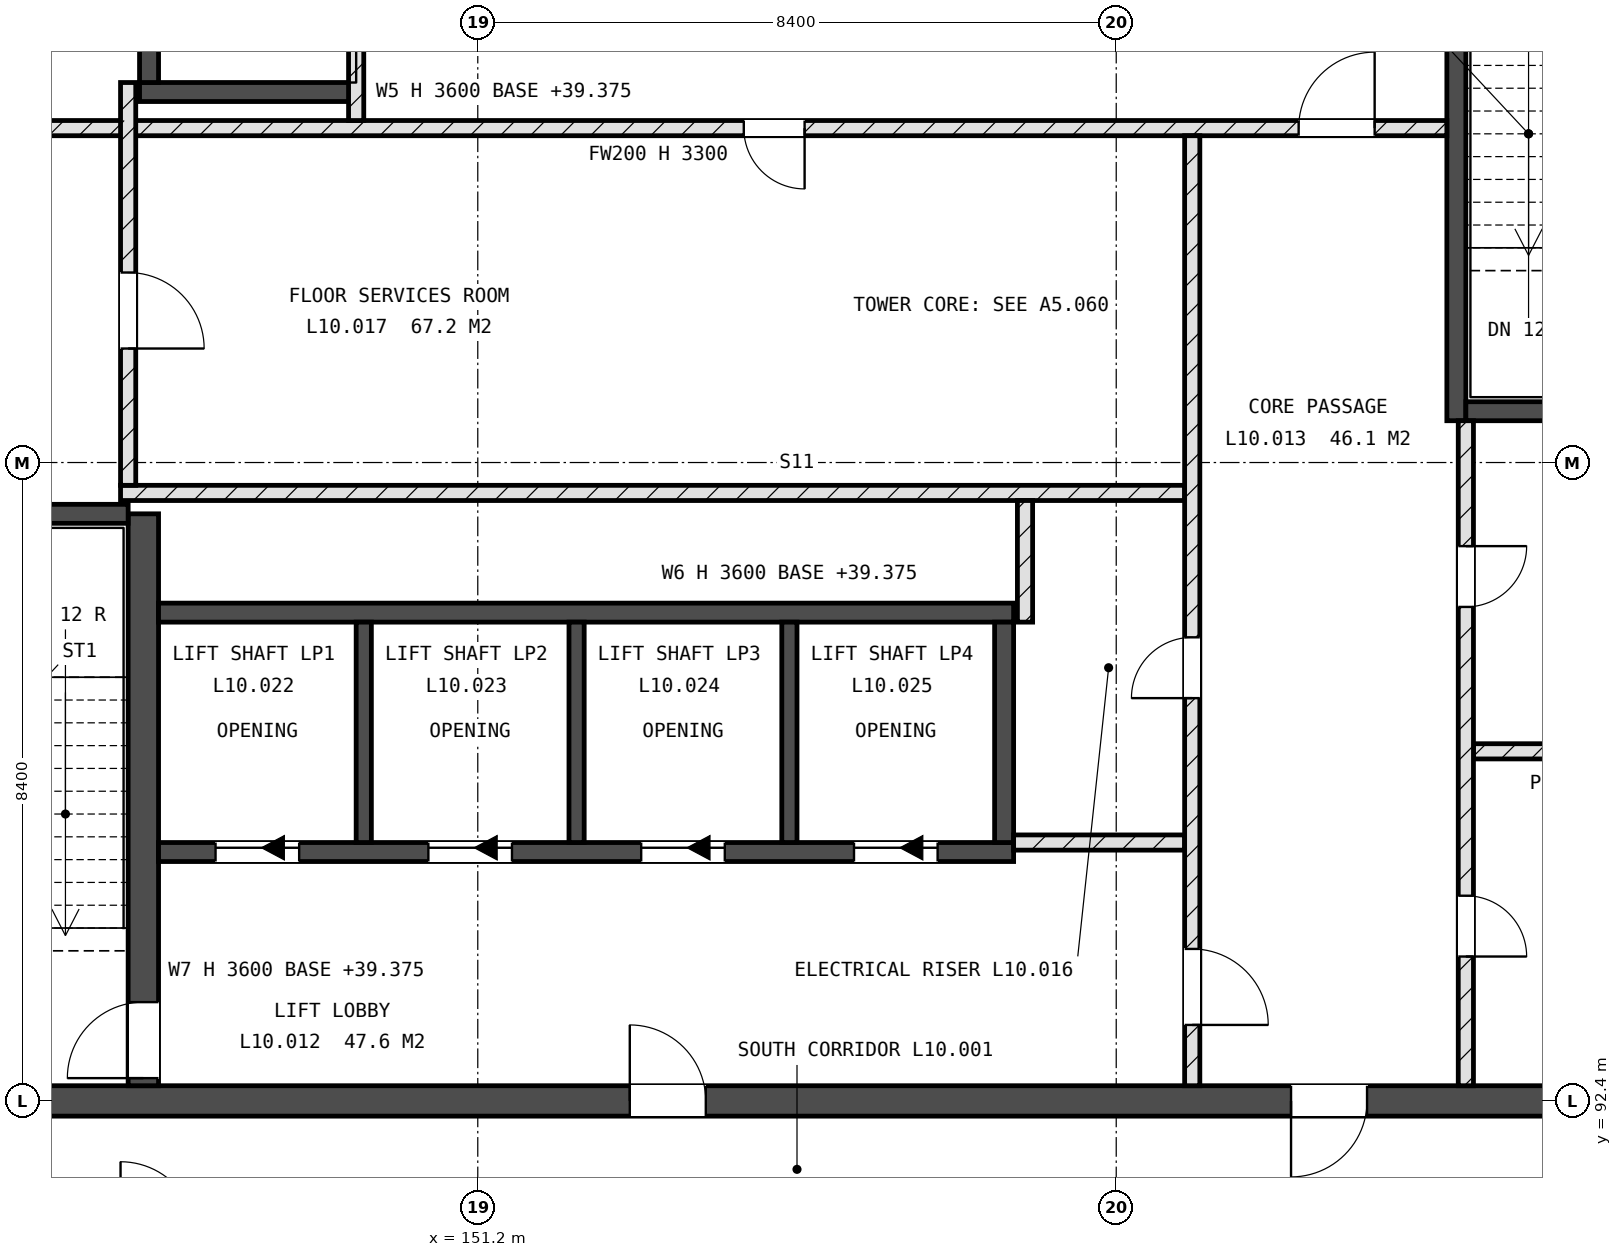
"""IFC4 building model, lengths in metres.
Left out: names, types, materials, properties, quantities, classifications, styles, units other than length and angle.
Written with IfcOpenShell. Run it as: python <this file> out.ifc"""

import sys

from ifc_helpers import new_model, si_unit, direction, frame, frame_2d, origin, place, context, subcontext, project, spatial, rectangle, extrude, element, fill, save


model = new_model("IFC4")
c1 = context("Model", 3, precision=1e-05, world=origin(), true_north=direction((0.0, 1.0)))
c2 = subcontext(c1, "Body", "Model", "MODEL_VIEW")
j1 = project(units=[si_unit("LENGTHUNIT", "METRE"), si_unit("PLANEANGLEUNIT", "RADIAN")], contexts=[c1])
p1 = place(None, origin())
s1 = spatial("IfcSite", under=j1, at=p1, CompositionType="ELEMENT")
p2 = place(p1, origin())
s2 = spatial("IfcBuilding", under=s1, at=p2, CompositionType="ELEMENT")
p3 = place(p2, frame((0.0, 0.0, 39.6)))
s3 = spatial("IfcBuildingStorey", under=s2, at=p3, CompositionType="ELEMENT", Elevation=39.6)
p4 = place(p3, frame((142.8, 92.4, -0.225), z_axis=(0.0, 0.0, 1.0), x_axis=(1.0, 0.0, 0.0)))
e1 = element("IfcWall", 1, at=p4, inside=s3, PredefinedType="SHEAR", context=c2, shape_type="SweptSolid", body=[
    extrude(rectangle(XDim=25.2, YDim=0.4, at=frame_2d((12.6, 0.0))), origin(), (0.0, 0.0, 1.0), 3.6),
])
p5 = place(p4, frame((1.4, 0.0, 0.225)))
e2 = element("IfcOpeningElement", 2, at=p5, cuts=e1, PredefinedType="OPENING", context=c2, shape_type="SweptSolid", body=[
    extrude(rectangle(XDim=1.0, YDim=2.1, at=frame_2d((0.5, 1.05))), frame((0.0, 0.21, 0.0), z_axis=(0.0, -1.0, 0.0), x_axis=(1.0, 0.0, 0.0)), (0.0, 0.0, 1.0), 0.42),
])
p6 = place(p4, frame((19.1, 0.0, 0.225)))
e3 = element("IfcOpeningElement", 3, at=p6, cuts=e1, PredefinedType="OPENING", context=c2, shape_type="SweptSolid", body=[
    extrude(rectangle(XDim=1.0, YDim=2.1, at=frame_2d((0.5, 1.05))), frame((0.0, 0.21, 0.0), z_axis=(0.0, -1.0, 0.0), x_axis=(1.0, 0.0, 0.0)), (0.0, 0.0, 1.0), 0.42),
])
p7 = place(p4, frame((10.4, 0.0, 0.225)))
e4 = element("IfcOpeningElement", 4, at=p7, cuts=e1, PredefinedType="OPENING", context=c2, shape_type="SweptSolid", body=[
    extrude(rectangle(XDim=1.0, YDim=2.1, at=frame_2d((0.5, 1.05))), frame((0.0, 0.21, 0.0), z_axis=(0.0, -1.0, 0.0), x_axis=(1.0, 0.0, 0.0)), (0.0, 0.0, 1.0), 0.42),
])
p8 = place(p3, frame((146.8, 92.6, -0.225), z_axis=(0.0, 0.0, 1.0), x_axis=(0.0, 1.0, 0.0)))
e5 = element("IfcWall", 5, at=p8, inside=s3, PredefinedType="SHEAR", context=c2, shape_type="SweptSolid", body=[
    extrude(rectangle(XDim=7.525, YDim=0.4, at=frame_2d((3.762, 0.0))), origin(), (0.0, 0.0, 1.0), 3.6),
])
p9 = place(p8, frame((0.1, 0.0, 0.225)))
e6 = element("IfcOpeningElement", 6, at=p9, cuts=e5, PredefinedType="OPENING", context=c2, shape_type="SweptSolid", body=[
    extrude(rectangle(XDim=1.0, YDim=2.1, at=frame_2d((0.5, 1.05))), frame((0.0, 0.21, 0.0), z_axis=(0.0, -1.0, 0.0), x_axis=(1.0, 0.0, 0.0)), (0.0, 0.0, 1.0), 0.42),
])
p10 = place(p3, frame((143.2, 100.125, -0.225), z_axis=(0.0, 0.0, 1.0), x_axis=(1.0, 0.0, 0.0)))
e7 = element("IfcWall", 7, at=p10, inside=s3, PredefinedType="SHEAR", context=c2, shape_type="SweptSolid", body=[
    extrude(rectangle(XDim=3.4, YDim=0.25, at=frame_2d((1.7, 0.0))), origin(), (0.0, 0.0, 1.0), 3.6),
])
p11 = place(p3, frame((164.075, 101.35, -0.225), z_axis=(0.0, 0.0, 1.0), x_axis=(0.0, 1.0, 0.0)))
e8 = element("IfcWall", 8, at=p11, inside=s3, PredefinedType="SHEAR", context=c2, shape_type="SweptSolid", body=[
    extrude(rectangle(XDim=7.65, YDim=0.25, at=frame_2d((3.825, 0.0))), origin(), (0.0, 0.0, 1.0), 3.6),
])
p12 = place(p11, frame((6.55, 0.0, 0.225)))
e9 = element("IfcOpeningElement", 9, at=p12, cuts=e8, PredefinedType="OPENING", context=c2, shape_type="SweptSolid", body=[
    extrude(rectangle(XDim=1.0, YDim=2.1, at=frame_2d((0.5, 1.05))), frame((0.0, 0.135, 0.0), z_axis=(0.0, -1.0, 0.0), x_axis=(1.0, 0.0, 0.0)), (0.0, 0.0, 1.0), 0.27),
])
p13 = place(p3, frame((164.2, 101.475, -0.225), z_axis=(0.0, 0.0, 1.0), x_axis=(1.0, 0.0, 0.0)))
e10 = element("IfcWall", 10, at=p13, inside=s3, PredefinedType="SHEAR", context=c2, shape_type="SweptSolid", body=[
    extrude(rectangle(XDim=3.6, YDim=0.25, at=frame_2d((1.8, 0.0))), origin(), (0.0, 0.0, 1.0), 3.6),
])
p14 = place(p3, frame((147.0, 95.675, -0.225), z_axis=(0.0, 0.0, 1.0), x_axis=(1.0, 0.0, 0.0)))
e11 = element("IfcWall", 11, at=p14, inside=s3, PredefinedType="SHEAR", context=c2, shape_type="SweptSolid", body=[
    extrude(rectangle(XDim=11.25, YDim=0.25, at=frame_2d((5.625, 0.0))), origin(), (0.0, 0.0, 1.0), 3.6),
])
p15 = place(p14, frame((0.75, 0.0, 0.225)))
e12 = element("IfcOpeningElement", 12, at=p15, cuts=e11, PredefinedType="OPENING", context=c2, shape_type="SweptSolid", body=[
    extrude(rectangle(XDim=1.1, YDim=2.1, at=frame_2d((0.55, 1.05))), frame((0.0, 0.135, 0.0), z_axis=(0.0, -1.0, 0.0), x_axis=(1.0, 0.0, 0.0)), (0.0, 0.0, 1.0), 0.27),
])
p16 = place(p14, frame((3.55, 0.0, 0.225)))
e13 = element("IfcOpeningElement", 13, at=p16, cuts=e11, PredefinedType="OPENING", context=c2, shape_type="SweptSolid", body=[
    extrude(rectangle(XDim=1.1, YDim=2.1, at=frame_2d((0.55, 1.05))), frame((0.0, 0.135, 0.0), z_axis=(0.0, -1.0, 0.0), x_axis=(1.0, 0.0, 0.0)), (0.0, 0.0, 1.0), 0.27),
])
p17 = place(p14, frame((6.35, 0.0, 0.225)))
e14 = element("IfcOpeningElement", 14, at=p17, cuts=e11, PredefinedType="OPENING", context=c2, shape_type="SweptSolid", body=[
    extrude(rectangle(XDim=1.1, YDim=2.1, at=frame_2d((0.55, 1.05))), frame((0.0, 0.135, 0.0), z_axis=(0.0, -1.0, 0.0), x_axis=(1.0, 0.0, 0.0)), (0.0, 0.0, 1.0), 0.27),
])
p18 = place(p14, frame((9.15, 0.0, 0.225)))
e15 = element("IfcOpeningElement", 15, at=p18, cuts=e11, PredefinedType="OPENING", context=c2, shape_type="SweptSolid", body=[
    extrude(rectangle(XDim=1.1, YDim=2.1, at=frame_2d((0.55, 1.05))), frame((0.0, 0.135, 0.0), z_axis=(0.0, -1.0, 0.0), x_axis=(1.0, 0.0, 0.0)), (0.0, 0.0, 1.0), 0.27),
])
p19 = place(p3, frame((147.0, 98.825, -0.225), z_axis=(0.0, 0.0, 1.0), x_axis=(1.0, 0.0, 0.0)))
e16 = element("IfcWall", 16, at=p19, inside=s3, PredefinedType="SHEAR", context=c2, shape_type="SweptSolid", body=[
    extrude(rectangle(XDim=11.25, YDim=0.25, at=frame_2d((5.625, 0.0))), origin(), (0.0, 0.0, 1.0), 3.6),
])
p20 = place(p3, frame((158.125, 95.8, -0.225), z_axis=(0.0, 0.0, 1.0), x_axis=(0.0, 1.0, 0.0)))
e17 = element("IfcWall", 17, at=p20, inside=s3, PredefinedType="SHEAR", context=c2, shape_type="SweptSolid", body=[
    extrude(rectangle(XDim=2.9, YDim=0.25, at=frame_2d((1.45, 0.0))), origin(), (0.0, 0.0, 1.0), 3.6),
])
for number, where, z_axis, x_axis in (
    (18, (149.7, 95.8, -0.225), (0.0, 0.0, 1.0), (0.0, 1.0, 0.0)),
    (19, (152.5, 95.8, -0.225), (0.0, 0.0, 1.0), (0.0, 1.0, 0.0)),
    (20, (155.3, 95.8, -0.225), (0.0, 0.0, 1.0), (0.0, 1.0, 0.0)),
):
    element("IfcWall", number, at=place(p3, frame(where, z_axis=z_axis, x_axis=x_axis)), inside=s3, PredefinedType="SHEAR", context=c2, shape_type="SweptSolid", body=[
        extrude(rectangle(XDim=2.9, YDim=0.2, at=frame_2d((1.45, 0.0))), origin(), (0.0, 0.0, 1.0), 3.6),
    ])
p21 = place(p3, frame((146.75, 105.675, -0.225), z_axis=(0.0, 0.0, 1.0), x_axis=(1.0, 0.0, 0.0)))
e21 = element("IfcWall", 21, at=p21, inside=s3, PredefinedType="SHEAR", context=c2, shape_type="SweptSolid", body=[
    extrude(rectangle(XDim=2.85, YDim=0.25, at=frame_2d((1.425, 0.0))), origin(), (0.0, 0.0, 1.0), 3.6),
])
p22 = place(p3, frame((146.875, 105.8, -0.225), z_axis=(0.0, 0.0, 1.0), x_axis=(0.0, 1.0, 0.0)))
e22 = element("IfcWall", 22, at=p22, inside=s3, PredefinedType="SHEAR", context=c2, shape_type="SweptSolid", body=[
    extrude(rectangle(XDim=2.9, YDim=0.25, at=frame_2d((1.45, 0.0))), origin(), (0.0, 0.0, 1.0), 3.6),
])
p23 = place(p3, frame((158.25, 95.8, 0.0), z_axis=(0.0, 0.0, 1.0), x_axis=(1.0, 0.0, 0.0)))
e23 = element("IfcWall", 23, at=p23, inside=s3, PredefinedType="SOLIDWALL", context=c2, shape_type="SweptSolid", body=[
    extrude(rectangle(XDim=2.25, YDim=0.2, at=frame_2d((1.125, 0.0))), origin(), (0.0, 0.0, 1.0), 3.3),
])
p24 = place(p3, frame((164.3, 97.0, 0.0), z_axis=(0.0, 0.0, 1.0), x_axis=(1.0, 0.0, 0.0)))
e24 = element("IfcWall", 24, at=p24, inside=s3, PredefinedType="SOLIDWALL", context=c2, shape_type="SweptSolid", body=[
    extrude(rectangle(XDim=3.3, YDim=0.2, at=frame_2d((1.65, 0.0))), origin(), (0.0, 0.0, 1.0), 3.3),
])
p25 = place(p3, frame((146.5, 100.4, 0.0), z_axis=(0.0, 0.0, 1.0), x_axis=(1.0, 0.0, 0.0)))
e25 = element("IfcWall", 25, at=p25, inside=s3, PredefinedType="SOLIDWALL", context=c2, shape_type="SweptSolid", body=[
    extrude(rectangle(XDim=14.0, YDim=0.2, at=frame_2d((7.0, 0.0))), origin(), (0.0, 0.0, 1.0), 3.3),
])
p26 = place(p3, frame((143.2, 105.2, 0.0), z_axis=(0.0, 0.0, 1.0), x_axis=(1.0, 0.0, 0.0)))
e26 = element("IfcWall", 26, at=p26, inside=s3, PredefinedType="SOLIDWALL", context=c2, shape_type="SweptSolid", body=[
    extrude(rectangle(XDim=20.75, YDim=0.2, at=frame_2d((10.375, 0.0))), origin(), (0.0, 0.0, 1.0), 3.3),
])
p27 = place(p26, frame((11.5, 0.0, 0.0)))
e27 = element("IfcOpeningElement", 27, at=p27, cuts=e26, PredefinedType="OPENING", context=c2, shape_type="SweptSolid", body=[
    extrude(rectangle(XDim=0.8, YDim=2.1, at=frame_2d((0.4, 1.05))), frame((0.0, 0.11, 0.0), z_axis=(0.0, -1.0, 0.0), x_axis=(1.0, 0.0, 0.0)), (0.0, 0.0, 1.0), 0.22),
])
p28 = place(p26, frame((18.8, 0.0, 0.0)))
e28 = element("IfcOpeningElement", 28, at=p28, cuts=e26, PredefinedType="OPENING", context=c2, shape_type="SweptSolid", body=[
    extrude(rectangle(XDim=1.0, YDim=2.1, at=frame_2d((0.5, 1.05))), frame((0.0, 0.11, 0.0), z_axis=(0.0, -1.0, 0.0), x_axis=(1.0, 0.0, 0.0)), (0.0, 0.0, 1.0), 0.22),
])
p29 = place(p3, frame((146.6, 100.5, 0.0), z_axis=(0.0, 0.0, 1.0), x_axis=(0.0, 1.0, 0.0)))
e29 = element("IfcWall", 29, at=p29, inside=s3, PredefinedType="SOLIDWALL", context=c2, shape_type="SweptSolid", body=[
    extrude(rectangle(XDim=5.3, YDim=0.2, at=frame_2d((2.65, 0.0))), origin(), (0.0, 0.0, 1.0), 3.3),
])
p30 = place(p29, frame((1.8, 0.0, 0.0)))
e30 = element("IfcOpeningElement", 30, at=p30, cuts=e29, PredefinedType="OPENING", context=c2, shape_type="SweptSolid", body=[
    extrude(rectangle(XDim=1.0, YDim=2.1, at=frame_2d((0.5, 1.05))), frame((0.0, 0.11, 0.0), z_axis=(0.0, -1.0, 0.0), x_axis=(1.0, 0.0, 0.0)), (0.0, 0.0, 1.0), 0.22),
])
p31 = place(p3, frame((149.6, 105.3, 0.0), z_axis=(0.0, 0.0, 1.0), x_axis=(0.0, 1.0, 0.0)))
e31 = element("IfcWall", 31, at=p31, inside=s3, PredefinedType="SOLIDWALL", context=c2, shape_type="SweptSolid", body=[
    extrude(rectangle(XDim=3.7, YDim=0.2, at=frame_2d((1.85, 0.0))), origin(), (0.0, 0.0, 1.0), 3.3),
])
p32 = place(p31, frame((1.4, 0.0, 0.0)))
e32 = element("IfcOpeningElement", 32, at=p32, cuts=e31, PredefinedType="OPENING", context=c2, shape_type="SweptSolid", body=[
    extrude(rectangle(XDim=1.1, YDim=2.1, at=frame_2d((0.55, 1.05))), frame((0.0, 0.11, 0.0), z_axis=(0.0, -1.0, 0.0), x_axis=(1.0, 0.0, 0.0)), (0.0, 0.0, 1.0), 0.22),
])
p33 = place(p3, frame((158.4, 98.7, 0.0), z_axis=(0.0, 0.0, 1.0), x_axis=(0.0, 1.0, 0.0)))
e33 = element("IfcWall", 33, at=p33, inside=s3, PredefinedType="SOLIDWALL", context=c2, shape_type="SweptSolid", body=[
    extrude(rectangle(XDim=1.6, YDim=0.2, at=frame_2d((0.8, 0.0))), origin(), (0.0, 0.0, 1.0), 3.3),
])
p34 = place(p3, frame((160.6, 92.6, 0.0), z_axis=(0.0, 0.0, 1.0), x_axis=(0.0, 1.0, 0.0)))
e34 = element("IfcWall", 34, at=p34, inside=s3, PredefinedType="SOLIDWALL", context=c2, shape_type="SweptSolid", body=[
    extrude(rectangle(XDim=12.5, YDim=0.2, at=frame_2d((6.25, 0.0))), origin(), (0.0, 0.0, 1.0), 3.3),
])
p35 = place(p34, frame((5.1, 0.0, 0.0)))
e35 = element("IfcOpeningElement", 35, at=p35, cuts=e34, PredefinedType="OPENING", context=c2, shape_type="SweptSolid", body=[
    extrude(rectangle(XDim=0.8, YDim=2.1, at=frame_2d((0.4, 1.05))), frame((0.0, 0.11, 0.0), z_axis=(0.0, -1.0, 0.0), x_axis=(1.0, 0.0, 0.0)), (0.0, 0.0, 1.0), 0.22),
])
p36 = place(p34, frame((0.8, 0.0, 0.0)))
e36 = element("IfcOpeningElement", 36, at=p36, cuts=e34, PredefinedType="OPENING", context=c2, shape_type="SweptSolid", body=[
    extrude(rectangle(XDim=1.0, YDim=2.1, at=frame_2d((0.5, 1.05))), frame((0.0, 0.11, 0.0), z_axis=(0.0, -1.0, 0.0), x_axis=(1.0, 0.0, 0.0)), (0.0, 0.0, 1.0), 0.22),
])
p37 = place(p3, frame((164.2, 92.6, 0.0), z_axis=(0.0, 0.0, 1.0), x_axis=(0.0, 1.0, 0.0)))
e37 = element("IfcWall", 37, at=p37, inside=s3, PredefinedType="SOLIDWALL", context=c2, shape_type="SweptSolid", body=[
    extrude(rectangle(XDim=8.75, YDim=0.2, at=frame_2d((4.375, 0.0))), origin(), (0.0, 0.0, 1.0), 3.3),
])
p38 = place(p37, frame((1.7, 0.0, 0.0)))
e38 = element("IfcOpeningElement", 38, at=p38, cuts=e37, PredefinedType="OPENING", context=c2, shape_type="SweptSolid", body=[
    extrude(rectangle(XDim=0.8, YDim=2.1, at=frame_2d((0.4, 1.05))), frame((0.0, 0.11, 0.0), z_axis=(0.0, -1.0, 0.0), x_axis=(1.0, 0.0, 0.0)), (0.0, 0.0, 1.0), 0.22),
])
p39 = place(p37, frame((6.3, 0.0, 0.0)))
e39 = element("IfcOpeningElement", 39, at=p39, cuts=e37, PredefinedType="OPENING", context=c2, shape_type="SweptSolid", body=[
    extrude(rectangle(XDim=0.8, YDim=2.1, at=frame_2d((0.4, 1.05))), frame((0.0, 0.11, 0.0), z_axis=(0.0, -1.0, 0.0), x_axis=(1.0, 0.0, 0.0)), (0.0, 0.0, 1.0), 0.22),
])
p40 = place(p15, origin())
e40 = element("IfcDoor", 40, at=p40, inside=s3, OperationType="SLIDING_TO_LEFT", PredefinedType="DOOR", context=c2, shape_type="SweptSolid", body=[
    extrude(rectangle(XDim=1.1, YDim=2.1, at=frame_2d((0.55, 1.05))), frame((0.0, 0.025, 0.0), z_axis=(0.0, -1.0, 0.0), x_axis=(1.0, 0.0, 0.0)), (0.0, 0.0, 1.0), 0.05),
])
fill(e12, e40)
p41 = place(p16, origin())
e41 = element("IfcDoor", 41, at=p41, inside=s3, OperationType="SLIDING_TO_LEFT", PredefinedType="DOOR", context=c2, shape_type="SweptSolid", body=[
    extrude(rectangle(XDim=1.1, YDim=2.1, at=frame_2d((0.55, 1.05))), frame((0.0, 0.025, 0.0), z_axis=(0.0, -1.0, 0.0), x_axis=(1.0, 0.0, 0.0)), (0.0, 0.0, 1.0), 0.05),
])
fill(e13, e41)
p42 = place(p17, origin())
e42 = element("IfcDoor", 42, at=p42, inside=s3, OperationType="SLIDING_TO_LEFT", PredefinedType="DOOR", context=c2, shape_type="SweptSolid", body=[
    extrude(rectangle(XDim=1.1, YDim=2.1, at=frame_2d((0.55, 1.05))), frame((0.0, 0.025, 0.0), z_axis=(0.0, -1.0, 0.0), x_axis=(1.0, 0.0, 0.0)), (0.0, 0.0, 1.0), 0.05),
])
fill(e14, e42)
p43 = place(p18, origin())
e43 = element("IfcDoor", 43, at=p43, inside=s3, OperationType="SLIDING_TO_LEFT", PredefinedType="DOOR", context=c2, shape_type="SweptSolid", body=[
    extrude(rectangle(XDim=1.1, YDim=2.1, at=frame_2d((0.55, 1.05))), frame((0.0, 0.025, 0.0), z_axis=(0.0, -1.0, 0.0), x_axis=(1.0, 0.0, 0.0)), (0.0, 0.0, 1.0), 0.05),
])
fill(e15, e43)
p44 = place(p9, origin())
e44 = element("IfcDoor", 44, at=p44, inside=s3, OperationType="SINGLE_SWING_RIGHT", PredefinedType="DOOR", context=c2, shape_type="SweptSolid", body=[
    extrude(rectangle(XDim=1.0, YDim=2.1, at=frame_2d((0.5, 1.05))), frame((0.0, 0.025, 0.0), z_axis=(0.0, -1.0, 0.0), x_axis=(1.0, 0.0, 0.0)), (0.0, 0.0, 1.0), 0.05),
])
fill(e6, e44)
p45 = place(p38, origin())
e45 = element("IfcDoor", 45, at=p45, inside=s3, OperationType="SINGLE_SWING_LEFT", PredefinedType="DOOR", context=c2, shape_type="SweptSolid", body=[
    extrude(rectangle(XDim=0.8, YDim=2.1, at=frame_2d((0.4, 1.05))), frame((0.0, 0.025, 0.0), z_axis=(0.0, -1.0, 0.0), x_axis=(1.0, 0.0, 0.0)), (0.0, 0.0, 1.0), 0.05),
])
fill(e38, e45)
p46 = place(p39, origin())
e46 = element("IfcDoor", 46, at=p46, inside=s3, OperationType="SINGLE_SWING_RIGHT", PredefinedType="DOOR", context=c2, shape_type="SweptSolid", body=[
    extrude(rectangle(XDim=0.8, YDim=2.1, at=frame_2d((0.4, 1.05))), frame((0.0, 0.025, 0.0), z_axis=(0.0, -1.0, 0.0), x_axis=(1.0, 0.0, 0.0)), (0.0, 0.0, 1.0), 0.05),
])
fill(e39, e46)
p47 = place(p35, origin())
e47 = element("IfcDoor", 47, at=p47, inside=s3, OperationType="SINGLE_SWING_RIGHT", PredefinedType="DOOR", context=c2, shape_type="SweptSolid", body=[
    extrude(rectangle(XDim=0.8, YDim=2.1, at=frame_2d((0.4, 1.05))), frame((0.0, 0.025, 0.0), z_axis=(0.0, -1.0, 0.0), x_axis=(1.0, 0.0, 0.0)), (0.0, 0.0, 1.0), 0.05),
])
fill(e35, e47)
p48 = place(p27, origin())
e48 = element("IfcDoor", 48, at=p48, inside=s3, OperationType="SINGLE_SWING_RIGHT", PredefinedType="DOOR", context=c2, shape_type="SweptSolid", body=[
    extrude(rectangle(XDim=0.8, YDim=2.1, at=frame_2d((0.4, 1.05))), frame((0.0, 0.025, 0.0), z_axis=(0.0, -1.0, 0.0), x_axis=(1.0, 0.0, 0.0)), (0.0, 0.0, 1.0), 0.05),
])
fill(e27, e48)
p49 = place(p30, origin())
e49 = element("IfcDoor", 49, at=p49, inside=s3, OperationType="SINGLE_SWING_LEFT", PredefinedType="DOOR", context=c2, shape_type="SweptSolid", body=[
    extrude(rectangle(XDim=1.0, YDim=2.1, at=frame_2d((0.5, 1.05))), frame((0.0, 0.025, 0.0), z_axis=(0.0, -1.0, 0.0), x_axis=(1.0, 0.0, 0.0)), (0.0, 0.0, 1.0), 0.05),
])
fill(e30, e49)
p50 = place(p6, origin())
e50 = element("IfcDoor", 50, at=p50, inside=s3, OperationType="SINGLE_SWING_LEFT", PredefinedType="DOOR", context=c2, shape_type="SweptSolid", body=[
    extrude(rectangle(XDim=1.0, YDim=2.1, at=frame_2d((0.5, 1.05))), frame((0.0, 0.025, 0.0), z_axis=(0.0, -1.0, 0.0), x_axis=(1.0, 0.0, 0.0)), (0.0, 0.0, 1.0), 0.05),
])
fill(e3, e50)
p51 = place(p7, origin())
e51 = element("IfcDoor", 51, at=p51, inside=s3, OperationType="SINGLE_SWING_RIGHT", PredefinedType="DOOR", context=c2, shape_type="SweptSolid", body=[
    extrude(rectangle(XDim=1.0, YDim=2.1, at=frame_2d((0.5, 1.05))), frame((0.0, 0.025, 0.0), z_axis=(0.0, -1.0, 0.0), x_axis=(1.0, 0.0, 0.0)), (0.0, 0.0, 1.0), 0.05),
])
fill(e4, e51)
p52 = place(p36, origin())
e52 = element("IfcDoor", 52, at=p52, inside=s3, OperationType="SINGLE_SWING_LEFT", PredefinedType="DOOR", context=c2, shape_type="SweptSolid", body=[
    extrude(rectangle(XDim=1.0, YDim=2.1, at=frame_2d((0.5, 1.05))), frame((0.0, 0.025, 0.0), z_axis=(0.0, -1.0, 0.0), x_axis=(1.0, 0.0, 0.0)), (0.0, 0.0, 1.0), 0.05),
])
fill(e36, e52)
p53 = place(p28, origin())
e53 = element("IfcDoor", 53, at=p53, inside=s3, OperationType="SINGLE_SWING_LEFT", PredefinedType="DOOR", context=c2, shape_type="SweptSolid", body=[
    extrude(rectangle(XDim=1.0, YDim=2.1, at=frame_2d((0.5, 1.05))), frame((0.0, 0.025, 0.0), z_axis=(0.0, -1.0, 0.0), x_axis=(1.0, 0.0, 0.0)), (0.0, 0.0, 1.0), 0.05),
])
fill(e28, e53)
save(model, sys.argv[1])
